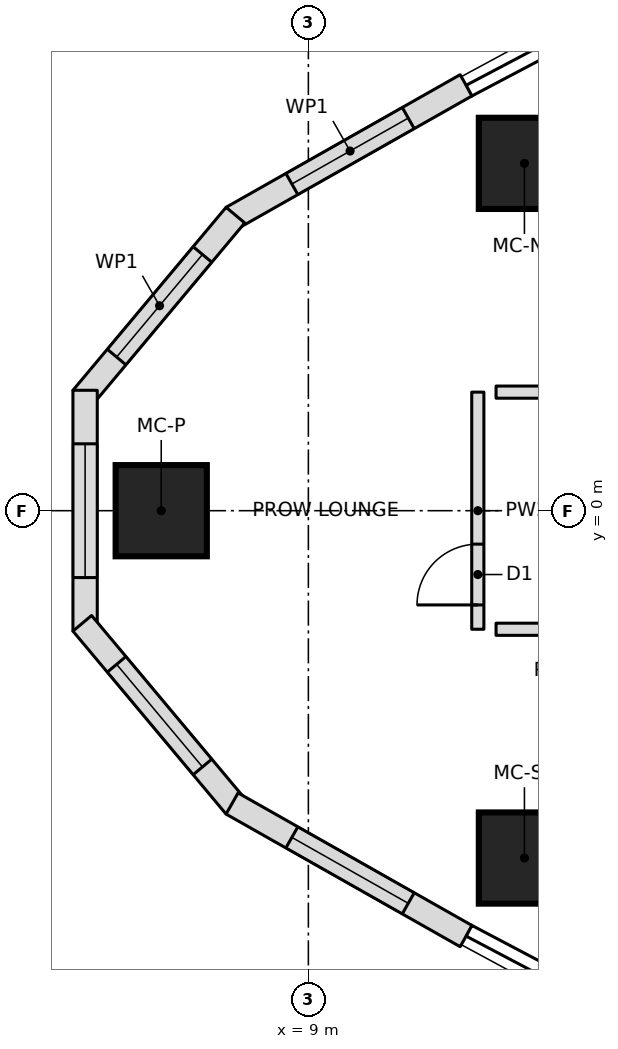
"""IFC4 building model, lengths in metres.
Left out: names, types, materials, properties, quantities, classifications, styles, units other than length and angle.
Written with IfcOpenShell. Run it as: python <this file> out.ifc"""

import sys

from ifc_helpers import new_model, si_unit, direction, frame, frame_2d, origin, origin_2d, place, context, subcontext, project, spatial, polyline, rectangle, outline, extrude, element, fill, save


model = new_model("IFC4")
c1 = context("Model", 3, precision=1e-05, world=origin(), true_north=direction((0.0, 1.0)))
c2 = subcontext(c1, "Body", "Model", "MODEL_VIEW")
j1 = project(units=[si_unit("LENGTHUNIT", "METRE"), si_unit("PLANEANGLEUNIT", "RADIAN")], contexts=[c1])
p1 = place(None, origin())
s1 = spatial("IfcSite", under=j1, at=p1, CompositionType="ELEMENT")
p2 = place(p1, origin())
s2 = spatial("IfcBuilding", under=s1, at=p2, CompositionType="ELEMENT")
p3 = place(p2, frame((0.0, 0.0, 144.4)))
s3 = spatial("IfcBuildingStorey", under=s2, at=p3, CompositionType="ELEMENT", Elevation=144.4)
for number, where, z_axis, x_axis in (
    (1, (6.58, 0.0, 0.0), (0.0, 0.0, 1.0), (1.0, 0.0, 0.0)),
    (2, (12.553, -5.713, 0.0), (0.0, 0.0, 1.0), (1.0, 0.0, 0.0)),
    (3, (12.553, 5.713, 0.0), (0.0, 0.0, 1.0), (1.0, 0.0, 0.0)),
):
    element("IfcColumn", number, at=place(p3, frame(where, z_axis=z_axis, x_axis=x_axis)), inside=s3, PredefinedType="COLUMN", context=c2, shape_type="SweptSolid", body=[
        extrude(rectangle(XDim=1.5, YDim=1.5, at=origin_2d()), origin(), (0.0, 0.0, 1.0), 3.55),
    ])
p4 = place(p3, frame((11.594, 6.997, 0.0), z_axis=(0.0, 0.0, 1.0), x_axis=(-0.870045255208, -0.492971859125, 0.0)))
e4 = element("IfcWall", 4, at=p4, inside=s3, PredefinedType="NOTDEFINED", context=c2, shape_type="SweptSolid", body=[
    extrude(outline(polyline([(0.0, -0.2), (4.424, -0.2), (4.352, 0.2), (0.0, 0.2), (0.0, -0.2)])), origin(), (0.0, 0.0, 1.0), 3.25),
])
p5 = place(p4, frame((1.094, 0.0, 0.6)))
e5 = element("IfcOpeningElement", 5, at=p5, cuts=e4, PredefinedType="OPENING", context=c2, shape_type="SweptSolid", body=[
    extrude(outline(polyline([(0.0, 1.35), (0.084, 1.771), (0.322, 2.128), (0.679, 2.366), (1.1, 2.45), (1.521, 2.366), (1.878, 2.128), (2.116, 1.771), (2.2, 1.35), (2.2, 1.1), (2.116, 0.679), (1.878, 0.322), (1.521, 0.084), (1.1, 0.0), (0.679, 0.084), (0.322, 0.322), (0.084, 0.679), (0.0, 1.1), (0.0, 1.35)])), frame((0.0, 0.21, 0.0), z_axis=(0.0, -1.0, 0.0), x_axis=(1.0, 0.0, 0.0)), (0.0, 0.0, 1.0), 0.42),
])
p6 = place(p3, frame((7.777, 4.834, 0.0), z_axis=(0.0, 0.0, 1.0), x_axis=(-0.641787918235, -0.766882173484, 0.0)))
e6 = element("IfcWall", 6, at=p6, inside=s3, PredefinedType="NOTDEFINED", context=c2, shape_type="SweptSolid", body=[
    extrude(outline(polyline([(-0.036, -0.2), (3.888, -0.2), (3.743, 0.2), (0.036, 0.2), (-0.036, -0.2)])), origin(), (0.0, 0.0, 1.0), 3.25),
])
p7 = place(p6, frame((0.808, 0.0, 0.6)))
e7 = element("IfcOpeningElement", 7, at=p7, cuts=e6, PredefinedType="OPENING", context=c2, shape_type="SweptSolid", body=[
    extrude(outline(polyline([(0.0, 1.35), (0.084, 1.771), (0.322, 2.128), (0.679, 2.366), (1.1, 2.45), (1.521, 2.366), (1.878, 2.128), (2.116, 1.771), (2.2, 1.35), (2.2, 1.1), (2.116, 0.679), (1.878, 0.322), (1.521, 0.084), (1.1, 0.0), (0.679, 0.084), (0.322, 0.322), (0.084, 0.679), (0.0, 1.1), (0.0, 1.35)])), frame((0.0, 0.21, 0.0), z_axis=(0.0, -1.0, 0.0), x_axis=(1.0, 0.0, 0.0)), (0.0, 0.0, 1.0), 0.42),
])
p8 = place(p3, frame((5.328, 1.908, 0.0), z_axis=(0.0, 0.0, 1.0), x_axis=(0.0, -1.0, 0.0)))
e8 = element("IfcWall", 8, at=p8, inside=s3, PredefinedType="NOTDEFINED", context=c2, shape_type="SweptSolid", body=[
    extrude(outline(polyline([(-0.073, -0.2), (3.888, -0.2), (3.743, 0.2), (0.073, 0.2), (-0.073, -0.2)])), origin(), (0.0, 0.0, 1.0), 3.25),
])
p9 = place(p8, frame((0.808, 0.0, 0.6)))
e9 = element("IfcOpeningElement", 9, at=p9, cuts=e8, PredefinedType="OPENING", context=c2, shape_type="SweptSolid", body=[
    extrude(outline(polyline([(0.0, 1.35), (0.084, 1.771), (0.322, 2.128), (0.679, 2.366), (1.1, 2.45), (1.521, 2.366), (1.878, 2.128), (2.116, 1.771), (2.2, 1.35), (2.2, 1.1), (2.116, 0.679), (1.878, 0.322), (1.521, 0.084), (1.1, 0.0), (0.679, 0.084), (0.322, 0.322), (0.084, 0.679), (0.0, 1.1), (0.0, 1.35)])), frame((0.0, 0.21, 0.0), z_axis=(0.0, -1.0, 0.0), x_axis=(1.0, 0.0, 0.0)), (0.0, 0.0, 1.0), 0.42),
])
p10 = place(p3, frame((5.328, -1.908, 0.0), z_axis=(0.0, 0.0, 1.0), x_axis=(0.641787918235, -0.766882173484, 0.0)))
e10 = element("IfcWall", 10, at=p10, inside=s3, PredefinedType="NOTDEFINED", context=c2, shape_type="SweptSolid", body=[
    extrude(outline(polyline([(-0.073, -0.2), (3.852, -0.2), (3.779, 0.2), (0.073, 0.2), (-0.073, -0.2)])), origin(), (0.0, 0.0, 1.0), 3.25),
])
p11 = place(p10, frame((0.808, 0.0, 0.6)))
e11 = element("IfcOpeningElement", 11, at=p11, cuts=e10, PredefinedType="OPENING", context=c2, shape_type="SweptSolid", body=[
    extrude(outline(polyline([(0.0, 1.35), (0.084, 1.771), (0.322, 2.128), (0.679, 2.366), (1.1, 2.45), (1.521, 2.366), (1.878, 2.128), (2.116, 1.771), (2.2, 1.35), (2.2, 1.1), (2.116, 0.679), (1.878, 0.322), (1.521, 0.084), (1.1, 0.0), (0.679, 0.084), (0.322, 0.322), (0.084, 0.679), (0.0, 1.1), (0.0, 1.35)])), frame((0.0, 0.21, 0.0), z_axis=(0.0, -1.0, 0.0), x_axis=(1.0, 0.0, 0.0)), (0.0, 0.0, 1.0), 0.42),
])
p12 = place(p3, frame((7.777, -4.834, 0.0), z_axis=(0.0, 0.0, 1.0), x_axis=(0.870045255208, -0.492971859125, 0.0)))
e12 = element("IfcWall", 12, at=p12, inside=s3, PredefinedType="NOTDEFINED", context=c2, shape_type="SweptSolid", body=[
    extrude(outline(polyline([(-0.036, -0.2), (4.388, -0.2), (4.388, 0.2), (0.036, 0.2), (-0.036, -0.2)])), origin(), (0.0, 0.0, 1.0), 3.25),
])
p13 = place(p12, frame((1.094, 0.0, 0.6)))
e13 = element("IfcOpeningElement", 13, at=p13, cuts=e12, PredefinedType="OPENING", context=c2, shape_type="SweptSolid", body=[
    extrude(outline(polyline([(0.0, 1.35), (0.084, 1.771), (0.322, 2.128), (0.679, 2.366), (1.1, 2.45), (1.521, 2.366), (1.878, 2.128), (2.116, 1.771), (2.2, 1.35), (2.2, 1.1), (2.116, 0.679), (1.878, 0.322), (1.521, 0.084), (1.1, 0.0), (0.679, 0.084), (0.322, 0.322), (0.084, 0.679), (0.0, 1.1), (0.0, 1.35)])), frame((0.0, 0.21, 0.0), z_axis=(0.0, -1.0, 0.0), x_axis=(1.0, 0.0, 0.0)), (0.0, 0.0, 1.0), 0.42),
])
p14 = place(p3, frame((12.087, 1.95, 0.0), z_axis=(0.0, 0.0, 1.0), x_axis=(1.0, 0.0, 0.0)))
e14 = element("IfcWall", 14, at=p14, inside=s3, PredefinedType="PARTITIONING", context=c2, shape_type="SweptSolid", body=[
    extrude(rectangle(XDim=3.372, YDim=0.2, at=frame_2d((1.686, 0.0))), origin(), (0.0, 0.0, 1.0), 3.25),
])
p15 = place(p14, frame((1.186, 0.0, 0.0)))
e15 = element("IfcOpeningElement", 15, at=p15, cuts=e14, PredefinedType="OPENING", context=c2, shape_type="SweptSolid", body=[
    extrude(rectangle(XDim=1.0, YDim=2.1, at=frame_2d((0.5, 1.05))), frame((0.0, 0.11, 0.0), z_axis=(0.0, -1.0, 0.0), x_axis=(1.0, 0.0, 0.0)), (0.0, 0.0, 1.0), 0.22),
])
p16 = place(p3, frame((12.087, -1.95, 0.0), z_axis=(0.0, 0.0, 1.0), x_axis=(1.0, 0.0, 0.0)))
e16 = element("IfcWall", 16, at=p16, inside=s3, PredefinedType="PARTITIONING", context=c2, shape_type="SweptSolid", body=[
    extrude(rectangle(XDim=3.372, YDim=0.2, at=frame_2d((1.686, 0.0))), origin(), (0.0, 0.0, 1.0), 3.25),
])
p17 = place(p16, frame((1.186, 0.0, 0.0)))
e17 = element("IfcOpeningElement", 17, at=p17, cuts=e16, PredefinedType="OPENING", context=c2, shape_type="SweptSolid", body=[
    extrude(rectangle(XDim=1.0, YDim=2.1, at=frame_2d((0.5, 1.05))), frame((0.0, 0.11, 0.0), z_axis=(0.0, -1.0, 0.0), x_axis=(1.0, 0.0, 0.0)), (0.0, 0.0, 1.0), 0.22),
])
p18 = place(p3, frame((11.787, -1.95, 0.0), z_axis=(0.0, 0.0, 1.0), x_axis=(0.0, 1.0, 0.0)))
e18 = element("IfcWall", 18, at=p18, inside=s3, PredefinedType="PARTITIONING", context=c2, shape_type="SweptSolid", body=[
    extrude(rectangle(XDim=3.9, YDim=0.2, at=frame_2d((1.95, 0.0))), origin(), (0.0, 0.0, 1.0), 3.25),
])
p19 = place(p18, frame((0.4, 0.0, 0.0)))
e19 = element("IfcOpeningElement", 19, at=p19, cuts=e18, PredefinedType="OPENING", context=c2, shape_type="SweptSolid", body=[
    extrude(rectangle(XDim=1.0, YDim=2.1, at=frame_2d((0.5, 1.05))), frame((0.0, 0.11, 0.0), z_axis=(0.0, -1.0, 0.0), x_axis=(1.0, 0.0, 0.0)), (0.0, 0.0, 1.0), 0.22),
])
p20 = place(p5, origin())
e20 = element("IfcWindow", 20, at=p20, inside=s3, PartitioningType="SINGLE_PANEL", PredefinedType="WINDOW", context=c2, shape_type="SweptSolid", body=[
    extrude(outline(polyline([(0.0, 1.35), (0.084, 1.771), (0.322, 2.128), (0.679, 2.366), (1.1, 2.45), (1.521, 2.366), (1.878, 2.128), (2.116, 1.771), (2.2, 1.35), (2.2, 1.1), (2.116, 0.679), (1.878, 0.322), (1.521, 0.084), (1.1, 0.0), (0.679, 0.084), (0.322, 0.322), (0.084, 0.679), (0.0, 1.1), (0.0, 1.35)])), frame((0.0, 0.17, 0.0), z_axis=(0.0, -1.0, 0.0), x_axis=(1.0, 0.0, 0.0)), (0.0, 0.0, 1.0), 0.06),
])
fill(e5, e20)
p21 = place(p7, origin())
e21 = element("IfcWindow", 21, at=p21, inside=s3, PartitioningType="SINGLE_PANEL", PredefinedType="WINDOW", context=c2, shape_type="SweptSolid", body=[
    extrude(outline(polyline([(0.0, 1.35), (0.084, 1.771), (0.322, 2.128), (0.679, 2.366), (1.1, 2.45), (1.521, 2.366), (1.878, 2.128), (2.116, 1.771), (2.2, 1.35), (2.2, 1.1), (2.116, 0.679), (1.878, 0.322), (1.521, 0.084), (1.1, 0.0), (0.679, 0.084), (0.322, 0.322), (0.084, 0.679), (0.0, 1.1), (0.0, 1.35)])), frame((0.0, 0.17, 0.0), z_axis=(0.0, -1.0, 0.0), x_axis=(1.0, 0.0, 0.0)), (0.0, 0.0, 1.0), 0.06),
])
fill(e7, e21)
p22 = place(p9, origin())
e22 = element("IfcWindow", 22, at=p22, inside=s3, PartitioningType="SINGLE_PANEL", PredefinedType="WINDOW", context=c2, shape_type="SweptSolid", body=[
    extrude(outline(polyline([(0.0, 1.35), (0.084, 1.771), (0.322, 2.128), (0.679, 2.366), (1.1, 2.45), (1.521, 2.366), (1.878, 2.128), (2.116, 1.771), (2.2, 1.35), (2.2, 1.1), (2.116, 0.679), (1.878, 0.322), (1.521, 0.084), (1.1, 0.0), (0.679, 0.084), (0.322, 0.322), (0.084, 0.679), (0.0, 1.1), (0.0, 1.35)])), frame((0.0, 0.17, 0.0), z_axis=(0.0, -1.0, 0.0), x_axis=(1.0, 0.0, 0.0)), (0.0, 0.0, 1.0), 0.06),
])
fill(e9, e22)
p23 = place(p11, origin())
e23 = element("IfcWindow", 23, at=p23, inside=s3, PartitioningType="SINGLE_PANEL", PredefinedType="WINDOW", context=c2, shape_type="SweptSolid", body=[
    extrude(outline(polyline([(0.0, 1.35), (0.084, 1.771), (0.322, 2.128), (0.679, 2.366), (1.1, 2.45), (1.521, 2.366), (1.878, 2.128), (2.116, 1.771), (2.2, 1.35), (2.2, 1.1), (2.116, 0.679), (1.878, 0.322), (1.521, 0.084), (1.1, 0.0), (0.679, 0.084), (0.322, 0.322), (0.084, 0.679), (0.0, 1.1), (0.0, 1.35)])), frame((0.0, 0.17, 0.0), z_axis=(0.0, -1.0, 0.0), x_axis=(1.0, 0.0, 0.0)), (0.0, 0.0, 1.0), 0.06),
])
fill(e11, e23)
p24 = place(p13, origin())
e24 = element("IfcWindow", 24, at=p24, inside=s3, PartitioningType="SINGLE_PANEL", PredefinedType="WINDOW", context=c2, shape_type="SweptSolid", body=[
    extrude(outline(polyline([(0.0, 1.35), (0.084, 1.771), (0.322, 2.128), (0.679, 2.366), (1.1, 2.45), (1.521, 2.366), (1.878, 2.128), (2.116, 1.771), (2.2, 1.35), (2.2, 1.1), (2.116, 0.679), (1.878, 0.322), (1.521, 0.084), (1.1, 0.0), (0.679, 0.084), (0.322, 0.322), (0.084, 0.679), (0.0, 1.1), (0.0, 1.35)])), frame((0.0, 0.17, 0.0), z_axis=(0.0, -1.0, 0.0), x_axis=(1.0, 0.0, 0.0)), (0.0, 0.0, 1.0), 0.06),
])
fill(e13, e24)
p25 = place(p19, origin())
e25 = element("IfcDoor", 25, at=p25, inside=s3, OperationType="SINGLE_SWING_LEFT", PredefinedType="DOOR", context=c2, shape_type="SweptSolid", body=[
    extrude(rectangle(XDim=1.0, YDim=2.1, at=frame_2d((0.5, 1.05))), frame((0.0, 0.025, 0.0), z_axis=(0.0, -1.0, 0.0), x_axis=(1.0, 0.0, 0.0)), (0.0, 0.0, 1.0), 0.05),
])
fill(e19, e25)
save(model, sys.argv[1])
